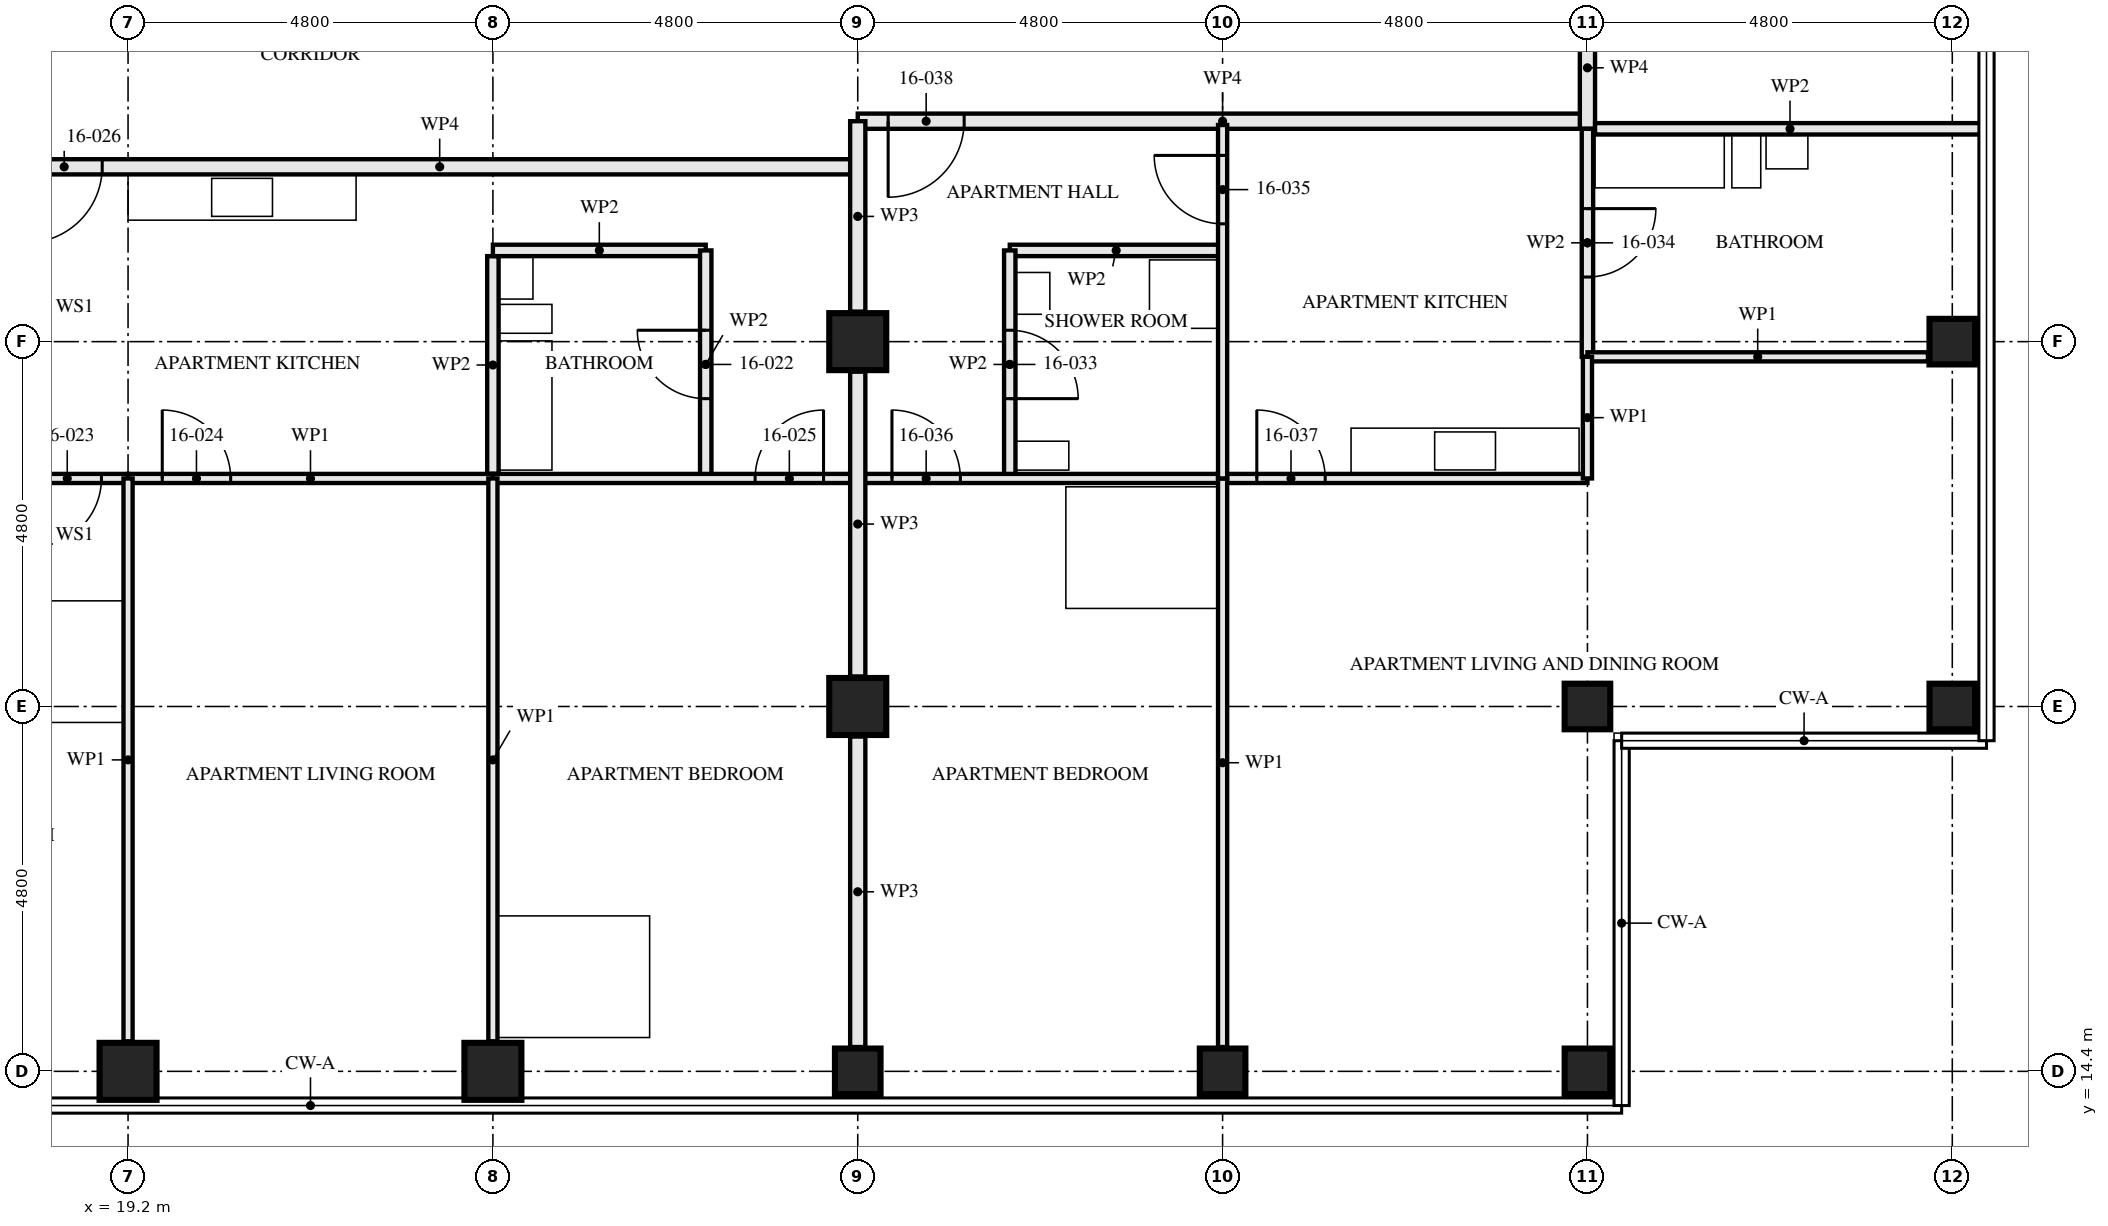
"""IFC4 building model, lengths in metres.
Left out: names, types, materials, properties, quantities, classifications, styles, units other than length and angle.
Written with IfcOpenShell. Run it as: python <this file> out.ifc"""

import sys

from ifc_helpers import new_model, si_unit, direction, frame, frame_2d, origin, origin_2d, place, context, subcontext, project, spatial, rectangle, hollow_rectangle, extrude, element, fill, save


model = new_model("IFC4")
c1 = context("Model", 3, precision=1e-05, world=origin(), true_north=direction((0.0, 1.0)))
c2 = subcontext(c1, "Body", "Model", "MODEL_VIEW")
j1 = project(units=[si_unit("LENGTHUNIT", "METRE"), si_unit("PLANEANGLEUNIT", "RADIAN")], contexts=[c1])
p1 = place(None, origin())
s1 = spatial("IfcSite", under=j1, at=p1, CompositionType="ELEMENT")
p2 = place(p1, origin())
s2 = spatial("IfcBuilding", under=s1, at=p2, CompositionType="ELEMENT")
p3 = place(p2, frame((0.0, 0.0, 62.0)))
s3 = spatial("IfcBuildingStorey", under=s2, at=p3, CompositionType="ELEMENT", Elevation=62.0)
for number, where, z_axis, x_axis in (
    (1, (19.2, 14.4, 0.0), (0.0, 0.0, 1.0), (0.0, 1.0, 0.0)),
    (2, (24.0, 14.4, 0.0), (0.0, 0.0, 1.0), (0.0, 1.0, 0.0)),
):
    element("IfcColumn", number, at=place(p3, frame(where, z_axis=z_axis, x_axis=x_axis)), inside=s3, PredefinedType="COLUMN", context=c2, shape_type="SweptSolid", body=[
        extrude(hollow_rectangle(XDim=0.75, YDim=0.75, WallThickness=0.08, at=origin_2d()), origin(), (0.0, 0.0, 1.0), 3.5),
    ])
p4 = place(p3, frame((28.8, 14.4, 0.0), z_axis=(0.0, 0.0, 1.0), x_axis=(0.0, 1.0, 0.0)))
e3 = element("IfcColumn", 3, at=p4, inside=s3, PredefinedType="COLUMN", context=c2, shape_type="SweptSolid", body=[
    extrude(hollow_rectangle(XDim=0.6, YDim=0.6, WallThickness=0.08, at=origin_2d()), origin(), (0.0, 0.0, 1.0), 3.5),
])
for number, where, z_axis, x_axis in (
    (4, (28.8, 19.2, 0.0), (0.0, 0.0, 1.0), (1.0, 0.0, 0.0)),
    (5, (28.8, 24.0, 0.0), (0.0, 0.0, 1.0), (1.0, 0.0, 0.0)),
):
    element("IfcColumn", number, at=place(p3, frame(where, z_axis=z_axis, x_axis=x_axis)), inside=s3, PredefinedType="COLUMN", context=c2, shape_type="SweptSolid", body=[
        extrude(hollow_rectangle(XDim=0.75, YDim=0.75, WallThickness=0.08, at=origin_2d()), origin(), (0.0, 0.0, 1.0), 3.5),
    ])
for number, where, z_axis, x_axis in (
    (6, (33.6, 14.4, 0.0), (0.0, 0.0, 1.0), (0.0, 1.0, 0.0)),
    (7, (38.4, 14.4, 0.0), (0.0, 0.0, 1.0), (0.0, 1.0, 0.0)),
    (8, (38.4, 19.2, 0.0), (0.0, 0.0, 1.0), (0.0, 1.0, 0.0)),
    (9, (43.2, 19.2, 0.0), (0.0, 0.0, 1.0), (0.0, 1.0, 0.0)),
    (10, (43.2, 24.0, 0.0), (0.0, 0.0, 1.0), (1.0, 0.0, 0.0)),
):
    element("IfcColumn", number, at=place(p3, frame(where, z_axis=z_axis, x_axis=x_axis)), inside=s3, PredefinedType="COLUMN", context=c2, shape_type="SweptSolid", body=[
        extrude(hollow_rectangle(XDim=0.6, YDim=0.6, WallThickness=0.08, at=origin_2d()), origin(), (0.0, 0.0, 1.0), 3.5),
    ])
p5 = place(p3, frame((26.8, 22.2, 0.0), z_axis=(0.0, 0.0, 1.0), x_axis=(0.0, 1.0, 0.0)))
e11 = element("IfcWall", 11, at=p5, inside=s3, PredefinedType="PARTITIONING", context=c2, shape_type="SweptSolid", body=[
    extrude(rectangle(XDim=3.0, YDim=0.15, at=frame_2d((1.5, 0.0))), origin(), (0.0, 0.0, 1.0), 2.55),
])
p6 = place(p5, frame((1.05, 0.0, 0.0)))
e12 = element("IfcOpeningElement", 12, at=p6, cuts=e11, PredefinedType="OPENING", context=c2, shape_type="SweptSolid", body=[
    extrude(rectangle(XDim=0.9, YDim=2.1, at=frame_2d((0.45, 1.05))), frame((0.0, 0.085, 0.0), z_axis=(0.0, -1.0, 0.0), x_axis=(1.0, 0.0, 0.0)), (0.0, 0.0, 1.0), 0.171),
])
p7 = place(p3, frame((24.0, 25.2, 0.0), z_axis=(0.0, 0.0, 1.0), x_axis=(1.0, 0.0, 0.0)))
e13 = element("IfcWall", 13, at=p7, inside=s3, PredefinedType="PARTITIONING", context=c2, shape_type="SweptSolid", body=[
    extrude(rectangle(XDim=2.8, YDim=0.15, at=frame_2d((1.4, 0.0))), origin(), (0.0, 0.0, 1.0), 3.33),
])
p8 = place(p3, frame((17.8, 22.2, 0.0), z_axis=(0.0, 0.0, 1.0), x_axis=(1.0, 0.0, 0.0)))
e14 = element("IfcWall", 14, at=p8, inside=s3, PredefinedType="PARTITIONING", context=c2, shape_type="SweptSolid", body=[
    extrude(rectangle(XDim=1.4, YDim=0.12, at=frame_2d((0.7, 0.0))), origin(), (0.0, 0.0, 1.0), 3.33),
])
p9 = place(p8, frame((0.15, 0.0, 0.0)))
e15 = element("IfcOpeningElement", 15, at=p9, cuts=e14, PredefinedType="OPENING", context=c2, shape_type="SweptSolid", body=[
    extrude(rectangle(XDim=0.9, YDim=2.1, at=frame_2d((0.45, 1.05))), frame((0.0, 0.071, 0.0), z_axis=(0.0, -1.0, 0.0), x_axis=(1.0, 0.0, 0.0)), (0.0, 0.0, 1.0), 0.141),
])
p10 = place(p3, frame((19.2, 22.2, 0.0), z_axis=(0.0, 0.0, 1.0), x_axis=(1.0, 0.0, 0.0)))
e16 = element("IfcWall", 16, at=p10, inside=s3, PredefinedType="PARTITIONING", context=c2, shape_type="SweptSolid", body=[
    extrude(rectangle(XDim=4.8, YDim=0.12, at=frame_2d((2.4, 0.0))), origin(), (0.0, 0.0, 1.0), 3.33),
])
p11 = place(p10, frame((0.45, 0.0, 0.0)))
e17 = element("IfcOpeningElement", 17, at=p11, cuts=e16, PredefinedType="OPENING", context=c2, shape_type="SweptSolid", body=[
    extrude(rectangle(XDim=0.9, YDim=2.1, at=frame_2d((0.45, 1.05))), frame((0.0, 0.071, 0.0), z_axis=(0.0, -1.0, 0.0), x_axis=(1.0, 0.0, 0.0)), (0.0, 0.0, 1.0), 0.141),
])
p12 = place(p3, frame((24.0, 22.2, 0.0), z_axis=(0.0, 0.0, 1.0), x_axis=(1.0, 0.0, 0.0)))
e18 = element("IfcWall", 18, at=p12, inside=s3, PredefinedType="PARTITIONING", context=c2, shape_type="SweptSolid", body=[
    extrude(rectangle(XDim=4.8, YDim=0.12, at=frame_2d((2.4, 0.0))), origin(), (0.0, 0.0, 1.0), 3.33),
])
p13 = place(p12, frame((3.45, 0.0, 0.0)))
e19 = element("IfcOpeningElement", 19, at=p13, cuts=e18, PredefinedType="OPENING", context=c2, shape_type="SweptSolid", body=[
    extrude(rectangle(XDim=0.9, YDim=2.1, at=frame_2d((0.45, 1.05))), frame((0.0, 0.071, 0.0), z_axis=(0.0, -1.0, 0.0), x_axis=(1.0, 0.0, 0.0)), (0.0, 0.0, 1.0), 0.141),
])
for number, where, z_axis, x_axis in (
    (20, (19.2, 14.795, 0.0), (0.0, 0.0, 1.0), (0.0, 1.0, 0.0)),
    (21, (24.0, 14.795, 0.0), (0.0, 0.0, 1.0), (0.0, 1.0, 0.0)),
):
    element("IfcWall", number, at=place(p3, frame(where, z_axis=z_axis, x_axis=x_axis)), inside=s3, PredefinedType="PARTITIONING", context=c2, shape_type="SweptSolid", body=[
        extrude(rectangle(XDim=7.405, YDim=0.12, at=frame_2d((3.703, 0.0))), origin(), (0.0, 0.0, 1.0), 2.55),
    ])
p14 = place(p3, frame((17.8, 26.3, 0.0), z_axis=(0.0, 0.0, 1.0), x_axis=(1.0, 0.0, 0.0)))
e22 = element("IfcWall", 22, at=p14, inside=s3, PredefinedType="PARTITIONING", context=c2, shape_type="SweptSolid", body=[
    extrude(rectangle(XDim=11.0, YDim=0.2, at=frame_2d((5.5, 0.0))), origin(), (0.0, 0.0, 1.0), 2.55),
])
p15 = place(p14, frame((0.06, 0.0, 0.0)))
e23 = element("IfcOpeningElement", 23, at=p15, cuts=e22, PredefinedType="OPENING", context=c2, shape_type="SweptSolid", body=[
    extrude(rectangle(XDim=1.0, YDim=2.1, at=frame_2d((0.5, 1.05))), frame((0.0, 0.111, 0.0), z_axis=(0.0, -1.0, 0.0), x_axis=(1.0, 0.0, 0.0)), (0.0, 0.0, 1.0), 0.221),
])
p16 = place(p3, frame((30.8, 22.2, 0.0), z_axis=(0.0, 0.0, 1.0), x_axis=(0.0, 1.0, 0.0)))
e24 = element("IfcWall", 24, at=p16, inside=s3, PredefinedType="PARTITIONING", context=c2, shape_type="SweptSolid", body=[
    extrude(rectangle(XDim=3.0, YDim=0.15, at=frame_2d((1.5, 0.0))), origin(), (0.0, 0.0, 1.0), 2.55),
])
p17 = place(p16, frame((1.05, 0.0, 0.0)))
e25 = element("IfcOpeningElement", 25, at=p17, cuts=e24, PredefinedType="OPENING", context=c2, shape_type="SweptSolid", body=[
    extrude(rectangle(XDim=0.9, YDim=2.1, at=frame_2d((0.45, 1.05))), frame((0.0, 0.085, 0.0), z_axis=(0.0, -1.0, 0.0), x_axis=(1.0, 0.0, 0.0)), (0.0, 0.0, 1.0), 0.171),
])
p18 = place(p3, frame((30.8, 25.2, 0.0), z_axis=(0.0, 0.0, 1.0), x_axis=(1.0, 0.0, 0.0)))
e26 = element("IfcWall", 26, at=p18, inside=s3, PredefinedType="PARTITIONING", context=c2, shape_type="SweptSolid", body=[
    extrude(rectangle(XDim=2.8, YDim=0.15, at=frame_2d((1.4, 0.0))), origin(), (0.0, 0.0, 1.0), 3.33),
])
p19 = place(p3, frame((38.4, 23.8, 0.0), z_axis=(0.0, 0.0, 1.0), x_axis=(0.0, 1.0, 0.0)))
e27 = element("IfcWall", 27, at=p19, inside=s3, PredefinedType="PARTITIONING", context=c2, shape_type="SweptSolid", body=[
    extrude(rectangle(XDim=3.0, YDim=0.15, at=frame_2d((1.5, 0.0))), origin(), (0.0, 0.0, 1.0), 2.55),
])
p20 = place(p19, frame((1.05, 0.0, 0.0)))
e28 = element("IfcOpeningElement", 28, at=p20, cuts=e27, PredefinedType="OPENING", context=c2, shape_type="SweptSolid", body=[
    extrude(rectangle(XDim=0.9, YDim=2.1, at=frame_2d((0.45, 1.05))), frame((0.0, 0.085, 0.0), z_axis=(0.0, -1.0, 0.0), x_axis=(1.0, 0.0, 0.0)), (0.0, 0.0, 1.0), 0.171),
])
p21 = place(p3, frame((33.6, 22.2, 0.0), z_axis=(0.0, 0.0, 1.0), x_axis=(0.0, 1.0, 0.0)))
e29 = element("IfcWall", 29, at=p21, inside=s3, PredefinedType="PARTITIONING", context=c2, shape_type="SweptSolid", body=[
    extrude(rectangle(XDim=4.65, YDim=0.12, at=frame_2d((2.325, 0.0))), origin(), (0.0, 0.0, 1.0), 2.55),
])
p22 = place(p21, frame((3.35, 0.0, 0.0)))
e30 = element("IfcOpeningElement", 30, at=p22, cuts=e29, PredefinedType="OPENING", context=c2, shape_type="SweptSolid", body=[
    extrude(rectangle(XDim=0.9, YDim=2.1, at=frame_2d((0.45, 1.05))), frame((0.0, 0.071, 0.0), z_axis=(0.0, -1.0, 0.0), x_axis=(1.0, 0.0, 0.0)), (0.0, 0.0, 1.0), 0.141),
])
p23 = place(p3, frame((28.8, 22.2, 0.0), z_axis=(0.0, 0.0, 1.0), x_axis=(1.0, 0.0, 0.0)))
e31 = element("IfcWall", 31, at=p23, inside=s3, PredefinedType="PARTITIONING", context=c2, shape_type="SweptSolid", body=[
    extrude(rectangle(XDim=4.8, YDim=0.12, at=frame_2d((2.4, 0.0))), origin(), (0.0, 0.0, 1.0), 3.33),
])
p24 = place(p23, frame((0.45, 0.0, 0.0)))
e32 = element("IfcOpeningElement", 32, at=p24, cuts=e31, PredefinedType="OPENING", context=c2, shape_type="SweptSolid", body=[
    extrude(rectangle(XDim=0.9, YDim=2.1, at=frame_2d((0.45, 1.05))), frame((0.0, 0.071, 0.0), z_axis=(0.0, -1.0, 0.0), x_axis=(1.0, 0.0, 0.0)), (0.0, 0.0, 1.0), 0.141),
])
p25 = place(p3, frame((33.6, 22.2, 0.0), z_axis=(0.0, 0.0, 1.0), x_axis=(1.0, 0.0, 0.0)))
e33 = element("IfcWall", 33, at=p25, inside=s3, PredefinedType="PARTITIONING", context=c2, shape_type="SweptSolid", body=[
    extrude(rectangle(XDim=4.8, YDim=0.12, at=frame_2d((2.4, 0.0))), origin(), (0.0, 0.0, 1.0), 3.33),
])
p26 = place(p25, frame((0.45, 0.0, 0.0)))
e34 = element("IfcOpeningElement", 34, at=p26, cuts=e33, PredefinedType="OPENING", context=c2, shape_type="SweptSolid", body=[
    extrude(rectangle(XDim=0.9, YDim=2.1, at=frame_2d((0.45, 1.05))), frame((0.0, 0.071, 0.0), z_axis=(0.0, -1.0, 0.0), x_axis=(1.0, 0.0, 0.0)), (0.0, 0.0, 1.0), 0.141),
])
p27 = place(p3, frame((38.4, 23.8, 0.0), z_axis=(0.0, 0.0, 1.0), x_axis=(1.0, 0.0, 0.0)))
e35 = element("IfcWall", 35, at=p27, inside=s3, PredefinedType="PARTITIONING", context=c2, shape_type="SweptSolid", body=[
    extrude(rectangle(XDim=4.48, YDim=0.12, at=frame_2d((2.24, 0.0))), origin(), (0.0, 0.0, 1.0), 3.33),
])
p28 = place(p3, frame((33.6, 14.72, 0.0), z_axis=(0.0, 0.0, 1.0), x_axis=(0.0, 1.0, 0.0)))
e36 = element("IfcWall", 36, at=p28, inside=s3, PredefinedType="PARTITIONING", context=c2, shape_type="SweptSolid", body=[
    extrude(rectangle(XDim=7.48, YDim=0.12, at=frame_2d((3.74, 0.0))), origin(), (0.0, 0.0, 1.0), 2.55),
])
p29 = place(p3, frame((38.4, 22.2, 0.0), z_axis=(0.0, 0.0, 1.0), x_axis=(0.0, 1.0, 0.0)))
e37 = element("IfcWall", 37, at=p29, inside=s3, PredefinedType="PARTITIONING", context=c2, shape_type="SweptSolid", body=[
    extrude(rectangle(XDim=1.6, YDim=0.12, at=frame_2d((0.8, 0.0))), origin(), (0.0, 0.0, 1.0), 3.33),
])
p30 = place(p3, frame((28.8, 26.9, 0.0), z_axis=(0.0, 0.0, 1.0), x_axis=(1.0, 0.0, 0.0)))
e38 = element("IfcWall", 38, at=p30, inside=s3, PredefinedType="PARTITIONING", context=c2, shape_type="SweptSolid", body=[
    extrude(rectangle(XDim=9.6, YDim=0.2, at=frame_2d((4.8, 0.0))), origin(), (0.0, 0.0, 1.0), 3.33),
])
p31 = place(p30, frame((0.4, 0.0, 0.0)))
e39 = element("IfcOpeningElement", 39, at=p31, cuts=e38, PredefinedType="OPENING", context=c2, shape_type="SweptSolid", body=[
    extrude(rectangle(XDim=1.0, YDim=2.1, at=frame_2d((0.5, 1.05))), frame((0.0, 0.111, 0.0), z_axis=(0.0, -1.0, 0.0), x_axis=(1.0, 0.0, 0.0)), (0.0, 0.0, 1.0), 0.221),
])
p32 = place(p3, frame((38.4, 26.8, 0.0), z_axis=(0.0, 0.0, 1.0), x_axis=(0.0, 1.0, 0.0)))
e40 = element("IfcWall", 40, at=p32, inside=s3, PredefinedType="PARTITIONING", context=c2, shape_type="SweptSolid", body=[
    extrude(rectangle(XDim=1.605, YDim=0.2, at=frame_2d((0.802, 0.0))), origin(), (0.0, 0.0, 1.0), 3.33),
])
p33 = place(p3, frame((28.8, 14.72, 0.0), z_axis=(0.0, 0.0, 1.0), x_axis=(0.0, 1.0, 0.0)))
e41 = element("IfcWall", 41, at=p33, inside=s3, PredefinedType="PARTITIONING", context=c2, shape_type="SweptSolid", body=[
    extrude(rectangle(XDim=4.085, YDim=0.2, at=frame_2d((2.042, 0.0))), origin(), (0.0, 0.0, 1.0), 2.32),
])
p34 = place(p3, frame((28.8, 19.595, 0.0), z_axis=(0.0, 0.0, 1.0), x_axis=(0.0, 1.0, 0.0)))
e42 = element("IfcWall", 42, at=p34, inside=s3, PredefinedType="PARTITIONING", context=c2, shape_type="SweptSolid", body=[
    extrude(rectangle(XDim=4.01, YDim=0.2, at=frame_2d((2.005, 0.0))), origin(), (0.0, 0.0, 1.0), 2.32),
])
p35 = place(p3, frame((28.8, 24.395, 0.0), z_axis=(0.0, 0.0, 1.0), x_axis=(0.0, 1.0, 0.0)))
e43 = element("IfcWall", 43, at=p35, inside=s3, PredefinedType="PARTITIONING", context=c2, shape_type="SweptSolid", body=[
    extrude(rectangle(XDim=2.505, YDim=0.2, at=frame_2d((1.252, 0.0))), origin(), (0.0, 0.0, 1.0), 2.32),
])
p36 = place(p3, frame((24.0, 22.26, 0.0), z_axis=(0.0, 0.0, 1.0), x_axis=(0.0, 1.0, 0.0)))
e44 = element("IfcWall", 44, at=p36, inside=s3, PredefinedType="PARTITIONING", context=c2, shape_type="SweptSolid", body=[
    extrude(rectangle(XDim=2.865, YDim=0.15, at=frame_2d((1.433, 0.0))), origin(), (0.0, 0.0, 1.0), 2.55),
])
p37 = place(p3, frame((38.5, 26.8, 0.0), z_axis=(0.0, 0.0, 1.0), x_axis=(1.0, 0.0, 0.0)))
e45 = element("IfcWall", 45, at=p37, inside=s3, PredefinedType="PARTITIONING", context=c2, shape_type="SweptSolid", body=[
    extrude(rectangle(XDim=5.13, YDim=0.15, at=frame_2d((2.565, 0.0))), origin(), (0.0, 0.0, 1.0), 2.32),
])
p38 = place(p6, origin())
e46 = element("IfcDoor", 46, at=p38, inside=s3, OperationType="SINGLE_SWING_LEFT", PredefinedType="DOOR", context=c2, shape_type="SweptSolid", body=[
    extrude(rectangle(XDim=0.9, YDim=2.1, at=frame_2d((0.45, 1.05))), frame((0.0, 0.022, 0.0), z_axis=(0.0, -1.0, 0.0), x_axis=(1.0, 0.0, 0.0)), (0.0, 0.0, 1.0), 0.044),
])
fill(e12, e46)
p39 = place(p9, frame((0.9, 0.0, 0.0), z_axis=(0.0, 0.0, 1.0), x_axis=(-1.0, 0.0, 0.0)))
e47 = element("IfcDoor", 47, at=p39, inside=s3, OperationType="SINGLE_SWING_LEFT", PredefinedType="DOOR", context=c2, shape_type="SweptSolid", body=[
    extrude(rectangle(XDim=0.9, YDim=2.1, at=frame_2d((0.45, 1.05))), frame((0.0, 0.022, 0.0), z_axis=(0.0, -1.0, 0.0), x_axis=(1.0, 0.0, 0.0)), (0.0, 0.0, 1.0), 0.044),
])
fill(e15, e47)
p40 = place(p11, origin())
e48 = element("IfcDoor", 48, at=p40, inside=s3, OperationType="SINGLE_SWING_RIGHT", PredefinedType="DOOR", context=c2, shape_type="SweptSolid", body=[
    extrude(rectangle(XDim=0.9, YDim=2.1, at=frame_2d((0.45, 1.05))), frame((0.0, 0.022, 0.0), z_axis=(0.0, -1.0, 0.0), x_axis=(1.0, 0.0, 0.0)), (0.0, 0.0, 1.0), 0.044),
])
fill(e17, e48)
p41 = place(p13, origin())
e49 = element("IfcDoor", 49, at=p41, inside=s3, OperationType="SINGLE_SWING_LEFT", PredefinedType="DOOR", context=c2, shape_type="SweptSolid", body=[
    extrude(rectangle(XDim=0.9, YDim=2.1, at=frame_2d((0.45, 1.05))), frame((0.0, 0.022, 0.0), z_axis=(0.0, -1.0, 0.0), x_axis=(1.0, 0.0, 0.0)), (0.0, 0.0, 1.0), 0.044),
])
fill(e19, e49)
p42 = place(p15, frame((1.0, 0.0, 0.0), z_axis=(0.0, 0.0, 1.0), x_axis=(-1.0, 0.0, 0.0)))
e50 = element("IfcDoor", 50, at=p42, inside=s3, OperationType="SINGLE_SWING_LEFT", PredefinedType="DOOR", context=c2, shape_type="SweptSolid", body=[
    extrude(rectangle(XDim=1.0, YDim=2.1, at=frame_2d((0.5, 1.05))), frame((0.0, 0.027, 0.0), z_axis=(0.0, -1.0, 0.0), x_axis=(1.0, 0.0, 0.0)), (0.0, 0.0, 1.0), 0.054),
])
fill(e23, e50)
p43 = place(p17, frame((0.9, 0.0, 0.0), z_axis=(0.0, 0.0, 1.0), x_axis=(-1.0, 0.0, 0.0)))
e51 = element("IfcDoor", 51, at=p43, inside=s3, OperationType="SINGLE_SWING_LEFT", PredefinedType="DOOR", context=c2, shape_type="SweptSolid", body=[
    extrude(rectangle(XDim=0.9, YDim=2.1, at=frame_2d((0.45, 1.05))), frame((0.0, 0.022, 0.0), z_axis=(0.0, -1.0, 0.0), x_axis=(1.0, 0.0, 0.0)), (0.0, 0.0, 1.0), 0.044),
])
fill(e25, e51)
p44 = place(p20, frame((0.9, 0.0, 0.0), z_axis=(0.0, 0.0, 1.0), x_axis=(-1.0, 0.0, 0.0)))
e52 = element("IfcDoor", 52, at=p44, inside=s3, OperationType="SINGLE_SWING_RIGHT", PredefinedType="DOOR", context=c2, shape_type="SweptSolid", body=[
    extrude(rectangle(XDim=0.9, YDim=2.1, at=frame_2d((0.45, 1.05))), frame((0.0, 0.022, 0.0), z_axis=(0.0, -1.0, 0.0), x_axis=(1.0, 0.0, 0.0)), (0.0, 0.0, 1.0), 0.044),
])
fill(e28, e52)
p45 = place(p22, origin())
e53 = element("IfcDoor", 53, at=p45, inside=s3, OperationType="SINGLE_SWING_LEFT", PredefinedType="DOOR", context=c2, shape_type="SweptSolid", body=[
    extrude(rectangle(XDim=0.9, YDim=2.1, at=frame_2d((0.45, 1.05))), frame((0.0, 0.022, 0.0), z_axis=(0.0, -1.0, 0.0), x_axis=(1.0, 0.0, 0.0)), (0.0, 0.0, 1.0), 0.044),
])
fill(e30, e53)
p46 = place(p24, origin())
e54 = element("IfcDoor", 54, at=p46, inside=s3, OperationType="SINGLE_SWING_RIGHT", PredefinedType="DOOR", context=c2, shape_type="SweptSolid", body=[
    extrude(rectangle(XDim=0.9, YDim=2.1, at=frame_2d((0.45, 1.05))), frame((0.0, 0.022, 0.0), z_axis=(0.0, -1.0, 0.0), x_axis=(1.0, 0.0, 0.0)), (0.0, 0.0, 1.0), 0.044),
])
fill(e32, e54)
p47 = place(p26, origin())
e55 = element("IfcDoor", 55, at=p47, inside=s3, OperationType="SINGLE_SWING_RIGHT", PredefinedType="DOOR", context=c2, shape_type="SweptSolid", body=[
    extrude(rectangle(XDim=0.9, YDim=2.1, at=frame_2d((0.45, 1.05))), frame((0.0, 0.022, 0.0), z_axis=(0.0, -1.0, 0.0), x_axis=(1.0, 0.0, 0.0)), (0.0, 0.0, 1.0), 0.044),
])
fill(e34, e55)
p48 = place(p31, frame((1.0, 0.0, 0.0), z_axis=(0.0, 0.0, 1.0), x_axis=(-1.0, 0.0, 0.0)))
e56 = element("IfcDoor", 56, at=p48, inside=s3, OperationType="SINGLE_SWING_LEFT", PredefinedType="DOOR", context=c2, shape_type="SweptSolid", body=[
    extrude(rectangle(XDim=1.0, YDim=2.1, at=frame_2d((0.5, 1.05))), frame((0.0, 0.027, 0.0), z_axis=(0.0, -1.0, 0.0), x_axis=(1.0, 0.0, 0.0)), (0.0, 0.0, 1.0), 0.054),
])
fill(e39, e56)
save(model, sys.argv[1])
